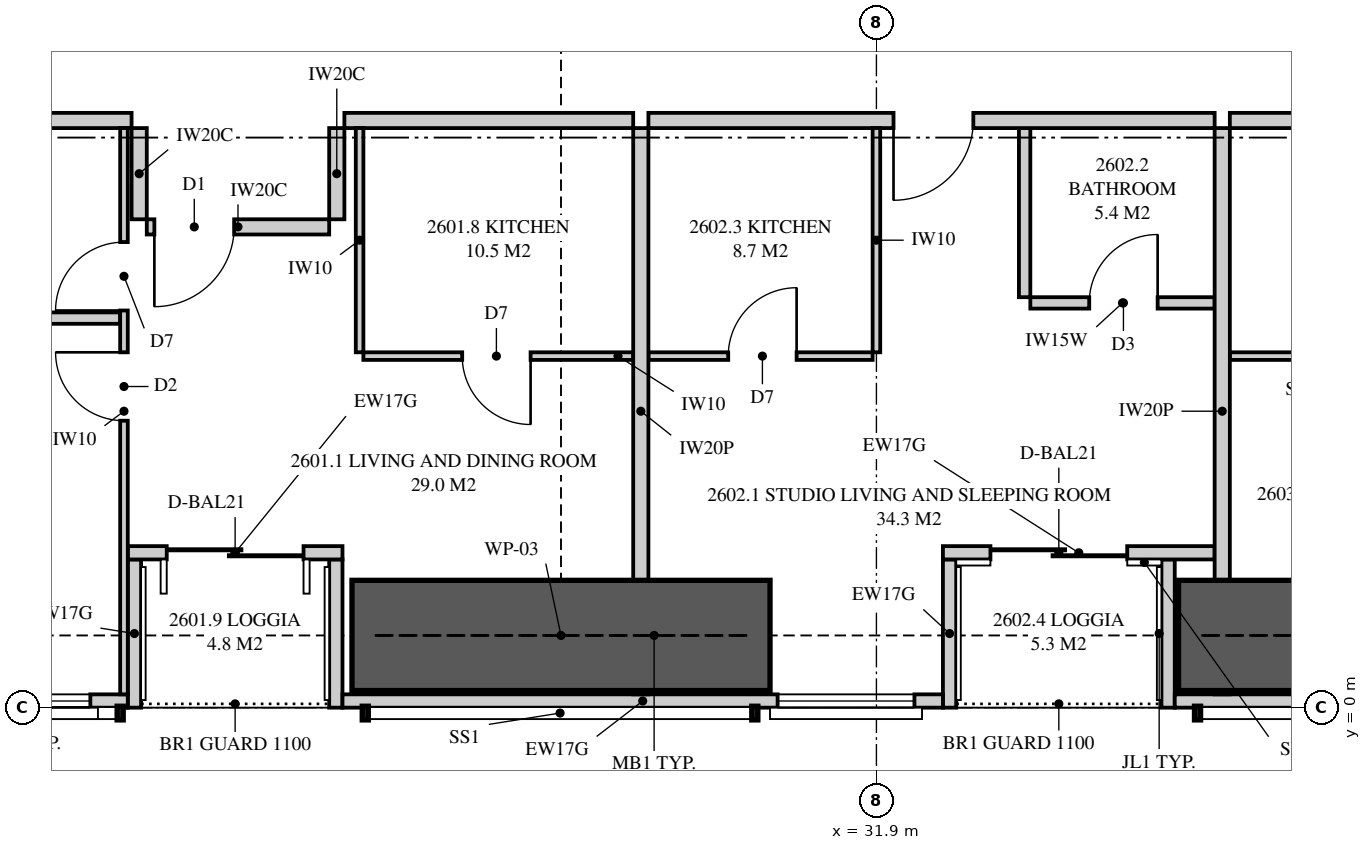
"""IFC4 building model, lengths in metres.
Left out: names, types, materials, properties, quantities, classifications, styles, units other than length and angle.
Written with IfcOpenShell. Run it as: python <this file> out.ifc"""

import sys

from ifc_helpers import new_model, si_unit, direction, frame, frame_2d, origin, place, context, subcontext, project, spatial, polyline, rectangle, outline, extrude, element, fill, save


model = new_model("IFC4")
c1 = context("Model", 3, precision=1e-05, world=origin(), true_north=direction((0.0, 1.0)))
c2 = subcontext(c1, "Body", "Model", "MODEL_VIEW")
j1 = project(units=[si_unit("LENGTHUNIT", "METRE"), si_unit("PLANEANGLEUNIT", "RADIAN")], contexts=[c1])
p1 = place(None, origin())
s1 = spatial("IfcSite", under=j1, at=p1, CompositionType="ELEMENT")
p2 = place(p1, origin())
s2 = spatial("IfcBuilding", under=s1, at=p2, CompositionType="ELEMENT")
p3 = place(p2, frame((0.0, 0.0, 98.15)))
s3 = spatial("IfcBuildingStorey", under=s2, at=p3, CompositionType="ELEMENT", Elevation=98.15)
p4 = place(p3, frame((9.051, 0.087, 0.0), z_axis=(0.0, 0.0, 1.0), x_axis=(1.0, 0.0, 0.0)))
e1 = element("IfcWall", 1, at=p4, inside=s3, PredefinedType="SOLIDWALL", context=c2, shape_type="SweptSolid", body=[
    extrude(outline(polyline([(0.0, 0.0), (12.999, 0.0), (12.999, 2.15), (7.824, 2.15), (7.824, 3.11), (7.666, 3.11), (7.666, 2.15), (7.62, 2.15), (7.62, 3.11), (0.0, 3.11), (0.0, 0.0)])), frame((0.0, 0.087, 0.0), z_axis=(0.0, -1.0, 0.0), x_axis=(1.0, 0.0, 0.0)), (0.0, 0.0, 1.0), 0.175),
])
p5 = place(p4, frame((3.134, 0.0, 0.4)))
e2 = element("IfcOpeningElement", 2, at=p5, cuts=e1, PredefinedType="OPENING", context=c2, shape_type="SweptSolid", body=[
    extrude(rectangle(XDim=1.8, YDim=1.7, at=frame_2d((0.9, 0.85))), frame((0.0, 0.097, 0.0), z_axis=(0.0, -1.0, 0.0), x_axis=(1.0, 0.0, 0.0)), (0.0, 0.0, 1.0), 0.195),
])
p6 = place(p4, frame((10.706, 0.0, 0.4)))
e3 = element("IfcOpeningElement", 3, at=p6, cuts=e1, PredefinedType="OPENING", context=c2, shape_type="SweptSolid", body=[
    extrude(rectangle(XDim=1.8, YDim=1.7, at=frame_2d((0.9, 0.85))), frame((0.0, 0.097, 0.0), z_axis=(0.0, -1.0, 0.0), x_axis=(1.0, 0.0, 0.0)), (0.0, 0.0, 1.0), 0.195),
])
p7 = place(p3, frame((24.875, 0.087, 0.0), z_axis=(0.0, 0.0, 1.0), x_axis=(1.0, 0.0, 0.0)))
e4 = element("IfcWall", 4, at=p7, inside=s3, PredefinedType="SOLIDWALL", context=c2, shape_type="SweptSolid", body=[
    extrude(rectangle(XDim=7.9, YDim=0.175, at=frame_2d((3.95, 0.0))), origin(), (0.0, 0.0, 1.0), 2.15),
])
p8 = place(p7, frame((5.725, 0.0, 0.4)))
e5 = element("IfcOpeningElement", 5, at=p8, cuts=e4, PredefinedType="OPENING", context=c2, shape_type="SweptSolid", body=[
    extrude(rectangle(XDim=1.8, YDim=1.7, at=frame_2d((0.9, 0.85))), frame((0.0, 0.097, 0.0), z_axis=(0.0, -1.0, 0.0), x_axis=(1.0, 0.0, 0.0)), (0.0, 0.0, 1.0), 0.195),
])
p9 = place(p3, frame((35.825, 0.087, 0.0), z_axis=(0.0, 0.0, 1.0), x_axis=(1.0, 0.0, 0.0)))
e6 = element("IfcWall", 6, at=p9, inside=s3, PredefinedType="SOLIDWALL", context=c2, shape_type="SweptSolid", body=[
    extrude(outline(polyline([(0.0, 0.0), (5.6, 0.0), (5.6, 3.11), (3.003, 3.11), (3.003, 2.15), (2.958, 2.15), (2.958, 3.11), (2.8, 3.11), (2.8, 2.15), (0.0, 2.15), (0.0, 0.0)])), frame((0.0, 0.087, 0.0), z_axis=(0.0, -1.0, 0.0), x_axis=(1.0, 0.0, 0.0)), (0.0, 0.0, 1.0), 0.175),
])
p10 = place(p3, frame((22.05, 2.038, 0.0), z_axis=(0.0, 0.0, 1.0), x_axis=(1.0, 0.0, 0.0)))
e7 = element("IfcWall", 7, at=p10, inside=s3, PredefinedType="SOLIDWALL", context=c2, shape_type="SweptSolid", body=[
    extrude(rectangle(XDim=2.825, YDim=0.175, at=frame_2d((1.413, 0.0))), origin(), (0.0, 0.0, 1.0), 3.11),
])
p11 = place(p10, frame((0.512, 0.0, 0.0)))
e8 = element("IfcOpeningElement", 8, at=p11, cuts=e7, PredefinedType="OPENING", context=c2, shape_type="SweptSolid", body=[
    extrude(rectangle(XDim=1.8, YDim=2.1, at=frame_2d((0.9, 1.05))), frame((0.0, 0.097, 0.0), z_axis=(0.0, -1.0, 0.0), x_axis=(1.0, 0.0, 0.0)), (0.0, 0.0, 1.0), 0.195),
])
for number, where, z_axis, x_axis in (
    (9, (22.137, 0.0, 0.0), (0.0, 0.0, 1.0), (0.0, 1.0, 0.0)),
    (10, (24.788, 0.0, 0.0), (0.0, 0.0, 1.0), (0.0, 1.0, 0.0)),
):
    element("IfcWall", number, at=place(p3, frame(where, z_axis=z_axis, x_axis=x_axis)), inside=s3, PredefinedType="SOLIDWALL", context=c2, shape_type="SweptSolid", body=[
        extrude(outline(polyline([(0.0, 0.0), (1.95, 0.0), (1.95, 3.11), (1.75, 3.11), (1.75, 2.15), (0.15, 2.15), (0.15, 3.11), (0.0, 3.11), (0.0, 0.0)])), frame((0.0, 0.087, 0.0), z_axis=(0.0, -1.0, 0.0), x_axis=(1.0, 0.0, 0.0)), (0.0, 0.0, 1.0), 0.175),
    ])
p12 = place(p3, frame((32.775, 2.038, 0.0), z_axis=(0.0, 0.0, 1.0), x_axis=(1.0, 0.0, 0.0)))
e11 = element("IfcWall", 11, at=p12, inside=s3, PredefinedType="SOLIDWALL", context=c2, shape_type="SweptSolid", body=[
    extrude(rectangle(XDim=3.575, YDim=0.175, at=frame_2d((1.788, 0.0))), origin(), (0.0, 0.0, 1.0), 3.11),
])
p13 = place(p12, frame((0.625, 0.0, 0.0)))
e12 = element("IfcOpeningElement", 12, at=p13, cuts=e11, PredefinedType="OPENING", context=c2, shape_type="SweptSolid", body=[
    extrude(rectangle(XDim=1.8, YDim=2.1, at=frame_2d((0.9, 1.05))), frame((0.0, 0.097, 0.0), z_axis=(0.0, -1.0, 0.0), x_axis=(1.0, 0.0, 0.0)), (0.0, 0.0, 1.0), 0.195),
])
for number, where, z_axis, x_axis in (
    (13, (32.863, 0.0, 0.0), (0.0, 0.0, 1.0), (0.0, 1.0, 0.0)),
    (14, (35.738, 0.0, 0.0), (0.0, 0.0, 1.0), (0.0, 1.0, 0.0)),
):
    element("IfcWall", number, at=place(p3, frame(where, z_axis=z_axis, x_axis=x_axis)), inside=s3, PredefinedType="SOLIDWALL", context=c2, shape_type="SweptSolid", body=[
        extrude(outline(polyline([(0.0, 0.0), (1.95, 0.0), (1.95, 3.11), (1.75, 3.11), (1.75, 2.15), (0.15, 2.15), (0.15, 3.11), (0.0, 3.11), (0.0, 0.0)])), frame((0.0, 0.087, 0.0), z_axis=(0.0, -1.0, 0.0), x_axis=(1.0, 0.0, 0.0)), (0.0, 0.0, 1.0), 0.175),
    ])
p14 = place(p3, frame((28.8, 0.175, 0.0), z_axis=(0.0, 0.0, 1.0), x_axis=(0.0, 1.0, 0.0)))
e15 = element("IfcWall", 15, at=p14, inside=s3, PredefinedType="PARTITIONING", context=c2, shape_type="SweptSolid", body=[
    extrude(outline(polyline([(0.529, 2.15), (0.0, 2.15), (0.0, 0.0), (0.529, 0.0), (0.529, 0.786), (1.021, 0.786), (1.021, 0.0), (7.45, 0.0), (7.45, 3.11), (1.685, 3.11), (1.685, 2.15), (1.021, 2.15), (1.021, 1.364), (0.529, 1.364), (0.529, 2.15)])), frame((0.0, 0.1, 0.0), z_axis=(0.0, -1.0, 0.0), x_axis=(1.0, 0.0, 0.0)), (0.0, 0.0, 1.0), 0.2),
])
p15 = place(p3, frame((17.775, 7.725, 0.0), z_axis=(0.0, 0.0, 1.0), x_axis=(1.0, 0.0, 0.0)))
e16 = element("IfcWall", 16, at=p15, inside=s3, PredefinedType="PARTITIONING", context=c2, shape_type="SweptSolid", body=[
    extrude(rectangle(XDim=4.325, YDim=0.2, at=frame_2d((2.163, 0.0))), origin(), (0.0, 0.0, 1.0), 3.11),
])
p16 = place(p3, frame((22.0, 0.175, 0.0), z_axis=(0.0, 0.0, 1.0), x_axis=(0.0, 1.0, 0.0)))
e17 = element("IfcWall", 17, at=p16, inside=s3, PredefinedType="PARTITIONING", context=c2, shape_type="SweptSolid", body=[
    extrude(outline(polyline([(0.0, 0.0), (7.45, 0.0), (7.45, 3.11), (1.635, 3.11), (1.635, 2.15), (0.0, 2.15), (0.0, 3.11), (0.0, 0.0)])), frame((0.0, 0.05, 0.0), z_axis=(0.0, -1.0, 0.0), x_axis=(1.0, 0.0, 0.0)), (0.0, 0.0, 1.0), 0.1),
])
p17 = place(p16, frame((3.6, 0.0, 0.0)))
e18 = element("IfcOpeningElement", 18, at=p17, cuts=e17, PredefinedType="OPENING", context=c2, shape_type="SweptSolid", body=[
    extrude(rectangle(XDim=0.9, YDim=2.1, at=frame_2d((0.45, 1.05))), frame((0.0, 0.06, 0.0), z_axis=(0.0, -1.0, 0.0), x_axis=(1.0, 0.0, 0.0)), (0.0, 0.0, 1.0), 0.12),
])
p18 = place(p16, frame((5.05, 0.0, 0.0)))
e19 = element("IfcOpeningElement", 19, at=p18, cuts=e17, PredefinedType="OPENING", context=c2, shape_type="SweptSolid", body=[
    extrude(rectangle(XDim=0.9, YDim=2.1, at=frame_2d((0.45, 1.05))), frame((0.0, 0.06, 0.0), z_axis=(0.0, -1.0, 0.0), x_axis=(1.0, 0.0, 0.0)), (0.0, 0.0, 1.0), 0.12),
])
p19 = place(p3, frame((17.75, 5.125, 0.0), z_axis=(0.0, 0.0, 1.0), x_axis=(1.0, 0.0, 0.0)))
e20 = element("IfcWall", 20, at=p19, inside=s3, PredefinedType="PLUMBINGWALL", context=c2, shape_type="SweptSolid", body=[
    extrude(rectangle(XDim=4.2, YDim=0.15, at=frame_2d((2.1, 0.0))), origin(), (0.0, 0.0, 1.0), 3.11),
])
p20 = place(p3, frame((25.15, 4.625, 0.0), z_axis=(0.0, 0.0, 1.0), x_axis=(1.0, 0.0, 0.0)))
e21 = element("IfcWall", 21, at=p20, inside=s3, PredefinedType="PARTITIONING", context=c2, shape_type="SweptSolid", body=[
    extrude(outline(polyline([(0.0, 0.0), (3.55, 0.0), (3.55, 3.11), (2.887, 3.11), (2.887, 2.541), (2.312, 2.541), (2.312, 3.11), (0.0, 3.11), (0.0, 0.0)])), frame((0.0, 0.05, 0.0), z_axis=(0.0, -1.0, 0.0), x_axis=(1.0, 0.0, 0.0)), (0.0, 0.0, 1.0), 0.1),
])
p21 = place(p20, frame((1.3, 0.0, 0.0)))
e22 = element("IfcOpeningElement", 22, at=p21, cuts=e21, PredefinedType="OPENING", context=c2, shape_type="SweptSolid", body=[
    extrude(rectangle(XDim=0.9, YDim=2.1, at=frame_2d((0.45, 1.05))), frame((0.0, 0.06, 0.0), z_axis=(0.0, -1.0, 0.0), x_axis=(1.0, 0.0, 0.0)), (0.0, 0.0, 1.0), 0.12),
])
p22 = place(p3, frame((25.1, 4.675, 0.0), z_axis=(0.0, 0.0, 1.0), x_axis=(0.0, 1.0, 0.0)))
e23 = element("IfcWall", 23, at=p22, inside=s3, PredefinedType="PARTITIONING", context=c2, shape_type="SweptSolid", body=[
    extrude(rectangle(XDim=2.95, YDim=0.1, at=frame_2d((1.475, 0.0))), origin(), (0.0, 0.0, 1.0), 3.11),
])
p23 = place(p3, frame((36.45, 0.175, 0.0), z_axis=(0.0, 0.0, 1.0), x_axis=(0.0, 1.0, 0.0)))
e24 = element("IfcWall", 24, at=p23, inside=s3, PredefinedType="PARTITIONING", context=c2, shape_type="SweptSolid", body=[
    extrude(outline(polyline([(0.529, 2.15), (0.0, 2.15), (0.0, 0.0), (0.529, 0.0), (0.529, 0.017), (1.021, 0.017), (1.021, 0.0), (7.45, 0.0), (7.45, 3.11), (1.685, 3.11), (1.685, 2.15), (1.021, 2.15), (1.021, 2.133), (0.529, 2.133), (0.529, 2.15)])), frame((0.0, 0.1, 0.0), z_axis=(0.0, -1.0, 0.0), x_axis=(1.0, 0.0, 0.0)), (0.0, 0.0, 1.0), 0.2),
])
p24 = place(p3, frame((28.9, 7.725, 0.0), z_axis=(0.0, 0.0, 1.0), x_axis=(1.0, 0.0, 0.0)))
e25 = element("IfcWall", 25, at=p24, inside=s3, PredefinedType="PARTITIONING", context=c2, shape_type="SweptSolid", body=[
    extrude(rectangle(XDim=7.45, YDim=0.2, at=frame_2d((3.725, 0.0))), origin(), (0.0, 0.0, 1.0), 3.11),
])
p25 = place(p24, frame((3.225, 0.0, 0.0)))
e26 = element("IfcOpeningElement", 26, at=p25, cuts=e25, PredefinedType="OPENING", context=c2, shape_type="SweptSolid", body=[
    extrude(rectangle(XDim=1.05, YDim=2.2, at=frame_2d((0.525, 1.1))), frame((0.0, 0.11, 0.0), z_axis=(0.0, -1.0, 0.0), x_axis=(1.0, 0.0, 0.0)), (0.0, 0.0, 1.0), 0.22),
])
p26 = place(p3, frame((33.925, 5.325, 0.0), z_axis=(0.0, 0.0, 1.0), x_axis=(1.0, 0.0, 0.0)))
e27 = element("IfcWall", 27, at=p26, inside=s3, PredefinedType="PLUMBINGWALL", context=c2, shape_type="SweptSolid", body=[
    extrude(rectangle(XDim=2.425, YDim=0.15, at=frame_2d((1.212, 0.0))), origin(), (0.0, 0.0, 1.0), 3.11),
])
p27 = place(p26, frame((0.775, 0.0, 0.0)))
e28 = element("IfcOpeningElement", 28, at=p27, cuts=e27, PredefinedType="OPENING", context=c2, shape_type="SweptSolid", body=[
    extrude(rectangle(XDim=0.9, YDim=2.1, at=frame_2d((0.45, 1.05))), frame((0.0, 0.085, 0.0), z_axis=(0.0, -1.0, 0.0), x_axis=(1.0, 0.0, 0.0)), (0.0, 0.0, 1.0), 0.17),
])
p28 = place(p3, frame((33.85, 5.4, 0.0), z_axis=(0.0, 0.0, 1.0), x_axis=(0.0, 1.0, 0.0)))
e29 = element("IfcWall", 29, at=p28, inside=s3, PredefinedType="PLUMBINGWALL", context=c2, shape_type="SweptSolid", body=[
    extrude(rectangle(XDim=2.225, YDim=0.15, at=frame_2d((1.113, 0.0))), origin(), (0.0, 0.0, 1.0), 3.11),
])
p29 = place(p3, frame((28.9, 4.625, 0.0), z_axis=(0.0, 0.0, 1.0), x_axis=(1.0, 0.0, 0.0)))
e30 = element("IfcWall", 30, at=p29, inside=s3, PredefinedType="PARTITIONING", context=c2, shape_type="SweptSolid", body=[
    extrude(rectangle(XDim=2.95, YDim=0.1, at=frame_2d((1.475, 0.0))), origin(), (0.0, 0.0, 1.0), 3.11),
])
p30 = place(p29, frame((1.05, 0.0, 0.0)))
e31 = element("IfcOpeningElement", 31, at=p30, cuts=e30, PredefinedType="OPENING", context=c2, shape_type="SweptSolid", body=[
    extrude(rectangle(XDim=0.9, YDim=2.1, at=frame_2d((0.45, 1.05))), frame((0.0, 0.06, 0.0), z_axis=(0.0, -1.0, 0.0), x_axis=(1.0, 0.0, 0.0)), (0.0, 0.0, 1.0), 0.12),
])
p31 = place(p3, frame((31.9, 4.675, 0.0), z_axis=(0.0, 0.0, 1.0), x_axis=(0.0, 1.0, 0.0)))
e32 = element("IfcWall", 32, at=p31, inside=s3, PredefinedType="PARTITIONING", context=c2, shape_type="SweptSolid", body=[
    extrude(rectangle(XDim=2.95, YDim=0.1, at=frame_2d((1.475, 0.0))), origin(), (0.0, 0.0, 1.0), 3.11),
])
p32 = place(p3, frame((36.55, 7.725, 0.0), z_axis=(0.0, 0.0, 1.0), x_axis=(1.0, 0.0, 0.0)))
e33 = element("IfcWall", 33, at=p32, inside=s3, PredefinedType="PARTITIONING", context=c2, shape_type="SweptSolid", body=[
    extrude(outline(polyline([(0.0, 0.0), (9.475, 0.0), (9.475, 3.11), (2.412, 3.11), (2.412, 2.541), (1.738, 2.541), (1.738, 3.11), (0.0, 3.11), (0.0, 0.0)])), frame((0.0, 0.1, 0.0), z_axis=(0.0, -1.0, 0.0), x_axis=(1.0, 0.0, 0.0)), (0.0, 0.0, 1.0), 0.2),
])
p33 = place(p32, frame((2.4, 0.0, 0.0)))
e34 = element("IfcOpeningElement", 34, at=p33, cuts=e33, PredefinedType="OPENING", context=c2, shape_type="SweptSolid", body=[
    extrude(rectangle(XDim=1.05, YDim=2.2, at=frame_2d((0.525, 1.1))), frame((0.0, 0.11, 0.0), z_axis=(0.0, -1.0, 0.0), x_axis=(1.0, 0.0, 0.0)), (0.0, 0.0, 1.0), 0.22),
])
p34 = place(p3, frame((36.55, 4.625, 0.0), z_axis=(0.0, 0.0, 1.0), x_axis=(1.0, 0.0, 0.0)))
e35 = element("IfcWall", 35, at=p34, inside=s3, PredefinedType="PARTITIONING", context=c2, shape_type="SweptSolid", body=[
    extrude(outline(polyline([(0.0, 0.0), (3.55, 0.0), (3.55, 3.11), (2.362, 3.11), (2.362, 2.541), (1.788, 2.541), (1.788, 3.11), (0.0, 3.11), (0.0, 0.0)])), frame((0.0, 0.05, 0.0), z_axis=(0.0, -1.0, 0.0), x_axis=(1.0, 0.0, 0.0)), (0.0, 0.0, 1.0), 0.1),
])
p35 = place(p34, frame((1.35, 0.0, 0.0)))
e36 = element("IfcOpeningElement", 36, at=p35, cuts=e35, PredefinedType="OPENING", context=c2, shape_type="SweptSolid", body=[
    extrude(rectangle(XDim=0.9, YDim=2.1, at=frame_2d((0.45, 1.05))), frame((0.0, 0.06, 0.0), z_axis=(0.0, -1.0, 0.0), x_axis=(1.0, 0.0, 0.0)), (0.0, 0.0, 1.0), 0.12),
])
p36 = place(p3, frame((24.9, 7.725, 0.0), z_axis=(0.0, 0.0, 1.0), x_axis=(1.0, 0.0, 0.0)))
e37 = element("IfcWall", 37, at=p36, inside=s3, PredefinedType="PARTITIONING", context=c2, shape_type="SweptSolid", body=[
    extrude(outline(polyline([(0.0, 0.0), (3.8, 0.0), (3.8, 3.11), (3.187, 3.11), (3.187, 2.541), (2.513, 2.541), (2.513, 3.11), (0.0, 3.11), (0.0, 0.0)])), frame((0.0, 0.1, 0.0), z_axis=(0.0, -1.0, 0.0), x_axis=(1.0, 0.0, 0.0)), (0.0, 0.0, 1.0), 0.2),
])
p37 = place(p3, frame((22.3, 6.325, 0.0), z_axis=(0.0, 0.0, 1.0), x_axis=(1.0, 0.0, 0.0)))
e38 = element("IfcWall", 38, at=p37, inside=s3, PredefinedType="PARTITIONING", context=c2, shape_type="SweptSolid", body=[
    extrude(rectangle(XDim=2.4, YDim=0.2, at=frame_2d((1.2, 0.0))), origin(), (0.0, 0.0, 1.0), 3.11),
])
p38 = place(p37, frame((0.1, 0.0, 0.0)))
e39 = element("IfcOpeningElement", 39, at=p38, cuts=e38, PredefinedType="OPENING", context=c2, shape_type="SweptSolid", body=[
    extrude(rectangle(XDim=1.05, YDim=2.2, at=frame_2d((0.525, 1.1))), frame((0.0, 0.11, 0.0), z_axis=(0.0, -1.0, 0.0), x_axis=(1.0, 0.0, 0.0)), (0.0, 0.0, 1.0), 0.22),
])
for number, where, z_axis, x_axis in (
    (40, (22.2, 7.625, 0.0), (0.0, 0.0, 1.0), (0.0, -1.0, 0.0)),
    (41, (24.8, 7.625, 0.0), (0.0, 0.0, 1.0), (0.0, -1.0, 0.0)),
):
    element("IfcWall", number, at=place(p3, frame(where, z_axis=z_axis, x_axis=x_axis)), inside=s3, PredefinedType="PARTITIONING", context=c2, shape_type="SweptSolid", body=[
        extrude(rectangle(XDim=1.2, YDim=0.2, at=frame_2d((0.6, 0.0))), origin(), (0.0, 0.0, 1.0), 3.11),
    ])
for number, where, z_axis, x_axis in (
    (42, (25.0, 0.95, 0.0), (0.0, 0.0, 1.0), (1.0, 0.0, 0.0)),
    (43, (35.875, 0.95, 0.0), (0.0, 0.0, 1.0), (1.0, 0.0, 0.0)),
):
    element("IfcWall", number, at=place(p3, frame(where, z_axis=z_axis, x_axis=x_axis)), inside=s3, PredefinedType="SHEAR", context=c2, shape_type="SweptSolid", body=[
        extrude(rectangle(XDim=5.5, YDim=1.45, at=frame_2d((2.75, 0.0))), origin(), (0.0, 0.0, 1.0), 3.35),
    ])
p39 = place(p6, origin())
e44 = element("IfcWindow", 44, at=p39, inside=s3, PartitioningType="SINGLE_PANEL", PredefinedType="WINDOW", context=c2, shape_type="SweptSolid", body=[
    extrude(rectangle(XDim=1.8, YDim=1.7, at=frame_2d((0.9, 0.85))), frame((0.0, 0.03, 0.0), z_axis=(0.0, -1.0, 0.0), x_axis=(1.0, 0.0, 0.0)), (0.0, 0.0, 1.0), 0.06),
])
fill(e3, e44)
p40 = place(p11, origin())
e45 = element("IfcDoor", 45, at=p40, inside=s3, OperationType="SLIDING_TO_LEFT", PredefinedType="DOOR", context=c2, shape_type="SweptSolid", body=[
    extrude(rectangle(XDim=1.8, YDim=2.1, at=frame_2d((0.9, 1.05))), frame((0.0, 0.025, 0.0), z_axis=(0.0, -1.0, 0.0), x_axis=(1.0, 0.0, 0.0)), (0.0, 0.0, 1.0), 0.05),
])
fill(e8, e45)
p41 = place(p13, origin())
e46 = element("IfcDoor", 46, at=p41, inside=s3, OperationType="SLIDING_TO_LEFT", PredefinedType="DOOR", context=c2, shape_type="SweptSolid", body=[
    extrude(rectangle(XDim=1.8, YDim=2.1, at=frame_2d((0.9, 1.05))), frame((0.0, 0.025, 0.0), z_axis=(0.0, -1.0, 0.0), x_axis=(1.0, 0.0, 0.0)), (0.0, 0.0, 1.0), 0.05),
])
fill(e12, e46)
p42 = place(p8, origin())
e47 = element("IfcWindow", 47, at=p42, inside=s3, PartitioningType="SINGLE_PANEL", PredefinedType="WINDOW", context=c2, shape_type="SweptSolid", body=[
    extrude(rectangle(XDim=1.8, YDim=1.7, at=frame_2d((0.9, 0.85))), frame((0.0, 0.03, 0.0), z_axis=(0.0, -1.0, 0.0), x_axis=(1.0, 0.0, 0.0)), (0.0, 0.0, 1.0), 0.06),
])
fill(e5, e47)
p43 = place(p38, frame((1.05, 0.0, 0.0), z_axis=(0.0, 0.0, 1.0), x_axis=(-1.0, 0.0, 0.0)))
e48 = element("IfcDoor", 48, at=p43, inside=s3, OperationType="SINGLE_SWING_RIGHT", PredefinedType="DOOR", context=c2, shape_type="SweptSolid", body=[
    extrude(rectangle(XDim=1.05, YDim=2.2, at=frame_2d((0.525, 1.1))), frame((0.0, 0.025, 0.0), z_axis=(0.0, -1.0, 0.0), x_axis=(1.0, 0.0, 0.0)), (0.0, 0.0, 1.0), 0.05),
])
fill(e39, e48)
p44 = place(p17, origin())
e49 = element("IfcDoor", 49, at=p44, inside=s3, OperationType="SINGLE_SWING_RIGHT", PredefinedType="DOOR", context=c2, shape_type="SweptSolid", body=[
    extrude(rectangle(XDim=0.9, YDim=2.1, at=frame_2d((0.45, 1.05))), frame((0.0, 0.025, 0.0), z_axis=(0.0, -1.0, 0.0), x_axis=(1.0, 0.0, 0.0)), (0.0, 0.0, 1.0), 0.05),
])
fill(e18, e49)
p45 = place(p18, origin())
e50 = element("IfcDoor", 50, at=p45, inside=s3, OperationType="SINGLE_SWING_LEFT", PredefinedType="DOOR", context=c2, shape_type="SweptSolid", body=[
    extrude(rectangle(XDim=0.9, YDim=2.1, at=frame_2d((0.45, 1.05))), frame((0.0, 0.025, 0.0), z_axis=(0.0, -1.0, 0.0), x_axis=(1.0, 0.0, 0.0)), (0.0, 0.0, 1.0), 0.05),
])
fill(e19, e50)
p46 = place(p21, frame((0.9, 0.0, 0.0), z_axis=(0.0, 0.0, 1.0), x_axis=(-1.0, 0.0, 0.0)))
e51 = element("IfcDoor", 51, at=p46, inside=s3, OperationType="SINGLE_SWING_LEFT", PredefinedType="DOOR", context=c2, shape_type="SweptSolid", body=[
    extrude(rectangle(XDim=0.9, YDim=2.1, at=frame_2d((0.45, 1.05))), frame((0.0, 0.025, 0.0), z_axis=(0.0, -1.0, 0.0), x_axis=(1.0, 0.0, 0.0)), (0.0, 0.0, 1.0), 0.05),
])
fill(e22, e51)
p47 = place(p25, frame((1.05, 0.0, 0.0), z_axis=(0.0, 0.0, 1.0), x_axis=(-1.0, 0.0, 0.0)))
e52 = element("IfcDoor", 52, at=p47, inside=s3, OperationType="SINGLE_SWING_RIGHT", PredefinedType="DOOR", context=c2, shape_type="SweptSolid", body=[
    extrude(rectangle(XDim=1.05, YDim=2.2, at=frame_2d((0.525, 1.1))), frame((0.0, 0.025, 0.0), z_axis=(0.0, -1.0, 0.0), x_axis=(1.0, 0.0, 0.0)), (0.0, 0.0, 1.0), 0.05),
])
fill(e26, e52)
p48 = place(p27, origin())
e53 = element("IfcDoor", 53, at=p48, inside=s3, OperationType="SINGLE_SWING_RIGHT", PredefinedType="DOOR", context=c2, shape_type="SweptSolid", body=[
    extrude(rectangle(XDim=0.9, YDim=2.1, at=frame_2d((0.45, 1.05))), frame((0.0, 0.025, 0.0), z_axis=(0.0, -1.0, 0.0), x_axis=(1.0, 0.0, 0.0)), (0.0, 0.0, 1.0), 0.05),
])
fill(e28, e53)
p49 = place(p30, origin())
e54 = element("IfcDoor", 54, at=p49, inside=s3, OperationType="SINGLE_SWING_RIGHT", PredefinedType="DOOR", context=c2, shape_type="SweptSolid", body=[
    extrude(rectangle(XDim=0.9, YDim=2.1, at=frame_2d((0.45, 1.05))), frame((0.0, 0.025, 0.0), z_axis=(0.0, -1.0, 0.0), x_axis=(1.0, 0.0, 0.0)), (0.0, 0.0, 1.0), 0.05),
])
fill(e31, e54)
save(model, sys.argv[1])
